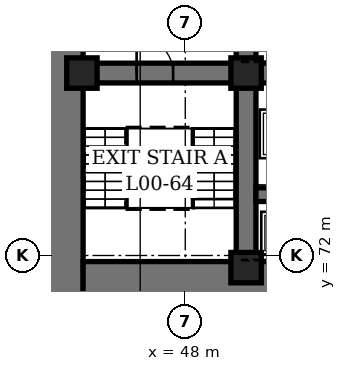
"""IFC4 building model, lengths in metres.
Left out: names, types, materials, properties, quantities, classifications, styles, units other than length and angle.
Written with IfcOpenShell. Run it as: python <this file> out.ifc"""

import sys

from ifc_helpers import new_model, si_unit, direction, frame, frame_2d, origin, origin_2d, place, context, subcontext, project, spatial, rectangle, hollow_rectangle, extrude, element, fill, save


model = new_model("IFC4")
c1 = context("Model", 3, precision=1e-05, world=origin(), true_north=direction((0.0, 1.0)))
c2 = subcontext(c1, "Body", "Model", "MODEL_VIEW")
j1 = project(units=[si_unit("LENGTHUNIT", "METRE"), si_unit("PLANEANGLEUNIT", "RADIAN")], contexts=[c1])
p1 = place(None, origin())
s1 = spatial("IfcSite", under=j1, at=p1, CompositionType="ELEMENT")
p2 = place(p1, origin())
s2 = spatial("IfcBuilding", under=s1, at=p2, CompositionType="ELEMENT")
p3 = place(p2, origin())
s3 = spatial("IfcBuildingStorey", under=s2, at=p3, CompositionType="ELEMENT", Elevation=0.0)
p4 = place(p3, frame((44.0, 70.2, -2.0), z_axis=(0.0, 0.0, 1.0), x_axis=(0.0, 1.0, 0.0)))
e1 = element("IfcWall", 1, at=p4, inside=s3, PredefinedType="SHEAR", context=c2, shape_type="SweptSolid", body=[
    extrude(rectangle(XDim=19.44, YDim=1.28, at=frame_2d((9.72, 0.0))), origin(), (0.0, 0.0, 1.0), 6.9),
])
p5 = place(p4, frame((8.8, 0.0, 2.0)))
e2 = element("IfcOpeningElement", 2, at=p5, cuts=e1, PredefinedType="OPENING", context=c2, shape_type="SweptSolid", body=[
    extrude(rectangle(XDim=2.0, YDim=2.4, at=frame_2d((1.0, 1.2))), frame((0.0, 0.65, 0.0), z_axis=(0.0, -1.0, 0.0), x_axis=(1.0, 0.0, 0.0)), (0.0, 0.0, 1.0), 1.3),
])
p6 = place(p3, frame((44.64, 71.0, -2.0), z_axis=(0.0, 0.0, 1.0), x_axis=(1.0, 0.0, 0.0)))
e3 = element("IfcWall", 3, at=p6, inside=s3, PredefinedType="SHEAR", context=c2, shape_type="SweptSolid", body=[
    extrude(rectangle(XDim=22.61, YDim=1.6, at=frame_2d((11.305, 0.0))), origin(), (0.0, 0.0, 1.0), 6.9),
])
p7 = place(p6, frame((6.31, 0.0, 2.0)))
e4 = element("IfcOpeningElement", 4, at=p7, cuts=e3, PredefinedType="OPENING", context=c2, shape_type="SweptSolid", body=[
    extrude(rectangle(XDim=1.1, YDim=2.2, at=frame_2d((0.55, 1.1))), frame((0.0, 0.81, 0.0), z_axis=(0.0, -1.0, 0.0), x_axis=(1.0, 0.0, 0.0)), (0.0, 0.0, 1.0), 1.62),
])
p8 = place(p6, frame((9.31, 0.0, 2.0)))
e5 = element("IfcOpeningElement", 5, at=p8, cuts=e3, PredefinedType="OPENING", context=c2, shape_type="SweptSolid", body=[
    extrude(rectangle(XDim=1.1, YDim=2.2, at=frame_2d((0.55, 1.1))), frame((0.0, 0.81, 0.0), z_axis=(0.0, -1.0, 0.0), x_axis=(1.0, 0.0, 0.0)), (0.0, 0.0, 1.0), 1.62),
])
p9 = place(p6, frame((12.31, 0.0, 2.0)))
e6 = element("IfcOpeningElement", 6, at=p9, cuts=e3, PredefinedType="OPENING", context=c2, shape_type="SweptSolid", body=[
    extrude(rectangle(XDim=1.1, YDim=2.2, at=frame_2d((0.55, 1.1))), frame((0.0, 0.81, 0.0), z_axis=(0.0, -1.0, 0.0), x_axis=(1.0, 0.0, 0.0)), (0.0, 0.0, 1.0), 1.62),
])
p10 = place(p6, frame((15.31, 0.0, 2.0)))
e7 = element("IfcOpeningElement", 7, at=p10, cuts=e3, PredefinedType="OPENING", context=c2, shape_type="SweptSolid", body=[
    extrude(rectangle(XDim=1.1, YDim=2.2, at=frame_2d((0.55, 1.1))), frame((0.0, 0.81, 0.0), z_axis=(0.0, -1.0, 0.0), x_axis=(1.0, 0.0, 0.0)), (0.0, 0.0, 1.0), 1.62),
])
p11 = place(p3, frame((50.0, 71.8, -2.0), z_axis=(0.0, 0.0, 1.0), x_axis=(0.0, 1.0, 0.0)))
e8 = element("IfcWall", 8, at=p11, inside=s3, PredefinedType="SHEAR", context=c2, shape_type="SweptSolid", body=[
    extrude(rectangle(XDim=16.56, YDim=0.65, at=frame_2d((8.28, 0.0))), origin(), (0.0, 0.0, 1.0), 6.9),
])
p12 = place(p11, frame((7.3, 0.0, 2.0)))
e9 = element("IfcOpeningElement", 9, at=p12, cuts=e8, PredefinedType="OPENING", context=c2, shape_type="SweptSolid", body=[
    extrude(rectangle(XDim=1.8, YDim=2.4, at=frame_2d((0.9, 1.2))), frame((0.0, 0.335, 0.0), z_axis=(0.0, -1.0, 0.0), x_axis=(1.0, 0.0, 0.0)), (0.0, 0.0, 1.0), 0.67),
])
p13 = place(p3, frame((44.64, 78.0, -2.0), z_axis=(0.0, 0.0, 1.0), x_axis=(1.0, 0.0, 0.0)))
e10 = element("IfcWall", 10, at=p13, inside=s3, PredefinedType="SHEAR", context=c2, shape_type="SweptSolid", body=[
    extrude(rectangle(XDim=5.035, YDim=0.65, at=frame_2d((2.518, 0.0))), origin(), (0.0, 0.0, 1.0), 6.9),
])
p14 = place(p13, frame((1.76, 0.0, 2.0)))
e11 = element("IfcOpeningElement", 11, at=p14, cuts=e10, PredefinedType="OPENING", context=c2, shape_type="SweptSolid", body=[
    extrude(rectangle(XDim=1.2, YDim=2.1, at=frame_2d((0.6, 1.05))), frame((0.0, 0.335, 0.0), z_axis=(0.0, -1.0, 0.0), x_axis=(1.0, 0.0, 0.0)), (0.0, 0.0, 1.0), 0.67),
])
p15 = place(p3, frame((50.325, 78.0, -2.0), z_axis=(0.0, 0.0, 1.0), x_axis=(1.0, 0.0, 0.0)))
e12 = element("IfcWall", 12, at=p15, inside=s3, PredefinedType="SHEAR", context=c2, shape_type="SweptSolid", body=[
    extrude(rectangle(XDim=11.35, YDim=0.65, at=frame_2d((5.675, 0.0))), origin(), (0.0, 0.0, 1.0), 6.9),
])
p16 = place(p15, frame((0.625, 0.0, 2.0)))
e13 = element("IfcOpeningElement", 13, at=p16, cuts=e12, PredefinedType="OPENING", context=c2, shape_type="SweptSolid", body=[
    extrude(rectangle(XDim=1.1, YDim=2.2, at=frame_2d((0.55, 1.1))), frame((0.0, 0.335, 0.0), z_axis=(0.0, -1.0, 0.0), x_axis=(1.0, 0.0, 0.0)), (0.0, 0.0, 1.0), 0.67),
])
p17 = place(p15, frame((3.625, 0.0, 2.0)))
e14 = element("IfcOpeningElement", 14, at=p17, cuts=e12, PredefinedType="OPENING", context=c2, shape_type="SweptSolid", body=[
    extrude(rectangle(XDim=1.1, YDim=2.2, at=frame_2d((0.55, 1.1))), frame((0.0, 0.335, 0.0), z_axis=(0.0, -1.0, 0.0), x_axis=(1.0, 0.0, 0.0)), (0.0, 0.0, 1.0), 0.67),
])
p18 = place(p15, frame((6.625, 0.0, 2.0)))
e15 = element("IfcOpeningElement", 15, at=p18, cuts=e12, PredefinedType="OPENING", context=c2, shape_type="SweptSolid", body=[
    extrude(rectangle(XDim=1.1, YDim=2.2, at=frame_2d((0.55, 1.1))), frame((0.0, 0.335, 0.0), z_axis=(0.0, -1.0, 0.0), x_axis=(1.0, 0.0, 0.0)), (0.0, 0.0, 1.0), 0.67),
])
p19 = place(p15, frame((9.625, 0.0, 2.0)))
e16 = element("IfcOpeningElement", 16, at=p19, cuts=e12, PredefinedType="OPENING", context=c2, shape_type="SweptSolid", body=[
    extrude(rectangle(XDim=1.1, YDim=2.2, at=frame_2d((0.55, 1.1))), frame((0.0, 0.335, 0.0), z_axis=(0.0, -1.0, 0.0), x_axis=(1.0, 0.0, 0.0)), (0.0, 0.0, 1.0), 0.67),
])
p20 = place(p3, frame((50.325, 74.0, -2.0), z_axis=(0.0, 0.0, 1.0), x_axis=(1.0, 0.0, 0.0)))
e17 = element("IfcWall", 17, at=p20, inside=s3, PredefinedType="SHEAR", context=c2, shape_type="SweptSolid", body=[
    extrude(rectangle(XDim=11.35, YDim=0.45, at=frame_2d((5.675, 0.0))), origin(), (0.0, 0.0, 1.0), 6.9),
])
for number, where, z_axis, x_axis in (
    (18, (44.6, 78.0, -2.0), (0.0, 0.0, 1.0), (1.0, 0.0, 0.0)),
    (19, (50.0, 71.6, -2.0), (0.0, 0.0, 1.0), (1.0, 0.0, 0.0)),
    (20, (50.0, 78.0, -2.0), (0.0, 0.0, 1.0), (1.0, 0.0, 0.0)),
):
    element("IfcColumn", number, at=place(p3, frame(where, z_axis=z_axis, x_axis=x_axis)), inside=s3, PredefinedType="COLUMN", context=c2, shape_type="SweptSolid", body=[
        extrude(hollow_rectangle(XDim=1.0, YDim=1.0, WallThickness=0.15, at=origin_2d()), origin(), (0.0, 0.0, 1.0), 6.9),
    ])
p21 = place(p14, origin())
e21 = element("IfcDoor", 21, at=p21, inside=s3, OperationType="SINGLE_SWING_LEFT", PredefinedType="DOOR", context=c2, shape_type="SweptSolid", body=[
    extrude(rectangle(XDim=1.2, YDim=2.1, at=frame_2d((0.6, 1.05))), frame((0.0, 0.325, 0.0), z_axis=(0.0, -1.0, 0.0), x_axis=(1.0, 0.0, 0.0)), (0.0, 0.0, 1.0), 0.649),
])
fill(e11, e21)
save(model, sys.argv[1])
